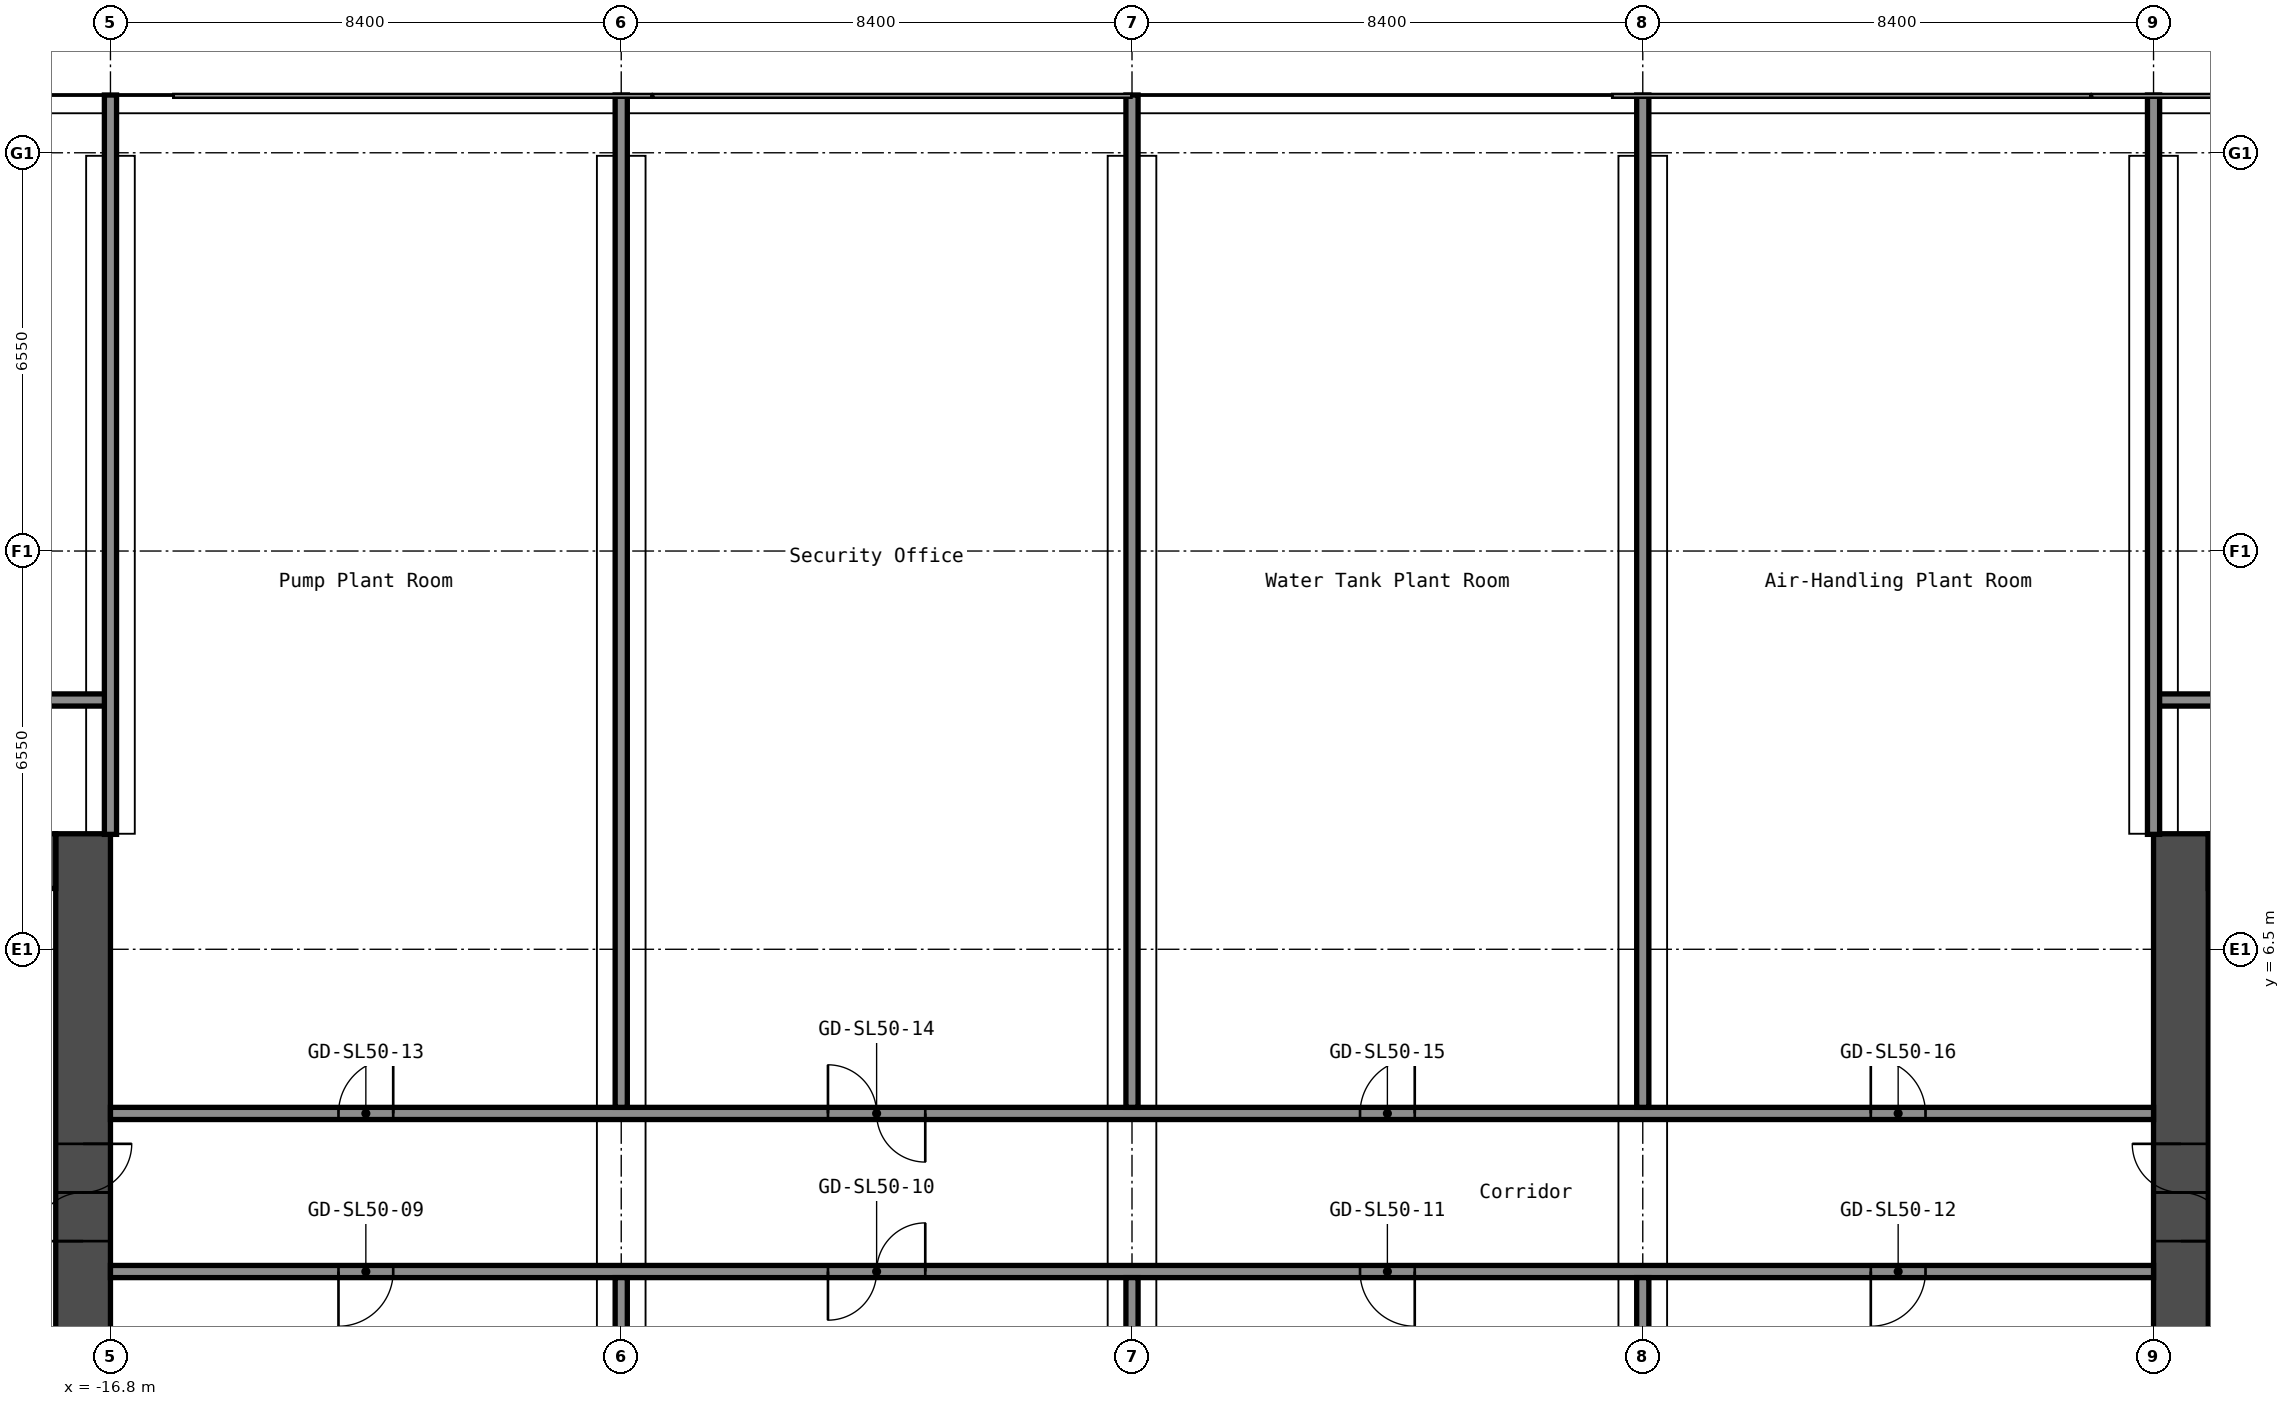
"""IFC4 building model, lengths in metres.
Left out: names, types, materials, properties, quantities, classifications, styles, units other than length and angle.
Written with IfcOpenShell. Run it as: python <this file> out.ifc"""

import sys

from ifc_helpers import new_model, si_unit, direction, frame, frame_2d, origin, place, context, subcontext, project, spatial, rectangle, extrude, element, fill, save


model = new_model("IFC4")
c1 = context("Model", 3, precision=1e-05, world=origin(), true_north=direction((0.0, 1.0)))
c2 = subcontext(c1, "Body", "Model", "MODEL_VIEW")
j1 = project(units=[si_unit("LENGTHUNIT", "METRE"), si_unit("PLANEANGLEUNIT", "RADIAN")], contexts=[c1])
p1 = place(None, origin())
s1 = spatial("IfcSite", under=j1, at=p1, CompositionType="ELEMENT")
p2 = place(p1, origin())
s2 = spatial("IfcBuilding", under=s1, at=p2, CompositionType="ELEMENT")
p3 = place(p2, frame((0.0, 0.0, 175.8)))
s3 = spatial("IfcBuildingStorey", under=s2, at=p3, CompositionType="ELEMENT", Elevation=175.8)
p4 = place(p3, frame((-17.25, -8.4, 0.0), z_axis=(0.0, 0.0, 1.0), x_axis=(0.0, 1.0, 0.0)))
e1 = element("IfcWall", 1, at=p4, inside=s3, PredefinedType="SHEAR", context=c2, shape_type="SweptSolid", body=[
    extrude(rectangle(XDim=16.8, YDim=0.9, at=frame_2d((8.4, 0.0))), origin(), (0.0, 0.0, 1.0), 4.1),
])
p5 = place(p4, frame((10.1, 0.0, 0.0)))
e2 = element("IfcOpeningElement", 2, at=p5, cuts=e1, PredefinedType="OPENING", context=c2, shape_type="SweptSolid", body=[
    extrude(rectangle(XDim=1.6, YDim=2.1, at=frame_2d((0.8, 1.05))), frame((0.0, 0.46, 0.0), z_axis=(0.0, -1.0, 0.0), x_axis=(1.0, 0.0, 0.0)), (0.0, 0.0, 1.0), 0.92),
])
p6 = place(p3, frame((-32.7, 7.95, 0.0), z_axis=(0.0, 0.0, 1.0), x_axis=(1.0, 0.0, 0.0)))
e3 = element("IfcWall", 3, at=p6, inside=s3, PredefinedType="SHEAR", context=c2, shape_type="SweptSolid", body=[
    extrude(rectangle(XDim=15.0, YDim=0.9, at=frame_2d((7.5, 0.0))), origin(), (0.0, 0.0, 1.0), 4.1),
])
p7 = place(p6, frame((3.4, 0.0, 0.0)))
e4 = element("IfcOpeningElement", 4, at=p7, cuts=e3, PredefinedType="OPENING", context=c2, shape_type="SweptSolid", body=[
    extrude(rectangle(XDim=1.2, YDim=2.1, at=frame_2d((0.6, 1.05))), frame((0.0, 0.46, 0.0), z_axis=(0.0, -1.0, 0.0), x_axis=(1.0, 0.0, 0.0)), (0.0, 0.0, 1.0), 0.92),
])
p8 = place(p6, frame((0.75, 0.0, 0.0)))
e5 = element("IfcOpeningElement", 5, at=p8, cuts=e3, PredefinedType="OPENING", context=c2, shape_type="SweptSolid", body=[
    extrude(rectangle(XDim=0.9, YDim=2.1, at=frame_2d((0.45, 1.05))), frame((0.0, 0.46, 0.0), z_axis=(0.0, -1.0, 0.0), x_axis=(1.0, 0.0, 0.0)), (0.0, 0.0, 1.0), 0.92),
])
p9 = place(p3, frame((17.25, -8.4, 0.0), z_axis=(0.0, 0.0, 1.0), x_axis=(0.0, 1.0, 0.0)))
e6 = element("IfcWall", 6, at=p9, inside=s3, PredefinedType="SHEAR", context=c2, shape_type="SweptSolid", body=[
    extrude(rectangle(XDim=16.8, YDim=0.9, at=frame_2d((8.4, 0.0))), origin(), (0.0, 0.0, 1.0), 4.1),
])
p10 = place(p9, frame((10.1, 0.0, 0.0)))
e7 = element("IfcOpeningElement", 7, at=p10, cuts=e6, PredefinedType="OPENING", context=c2, shape_type="SweptSolid", body=[
    extrude(rectangle(XDim=1.6, YDim=2.1, at=frame_2d((0.8, 1.05))), frame((0.0, 0.46, 0.0), z_axis=(0.0, -1.0, 0.0), x_axis=(1.0, 0.0, 0.0)), (0.0, 0.0, 1.0), 0.92),
])
p11 = place(p3, frame((17.7, 7.95, 0.0), z_axis=(0.0, 0.0, 1.0), x_axis=(1.0, 0.0, 0.0)))
e8 = element("IfcWall", 8, at=p11, inside=s3, PredefinedType="SHEAR", context=c2, shape_type="SweptSolid", body=[
    extrude(rectangle(XDim=15.0, YDim=0.9, at=frame_2d((7.5, 0.0))), origin(), (0.0, 0.0, 1.0), 4.1),
])
p12 = place(p11, frame((10.4, 0.0, 0.0)))
e9 = element("IfcOpeningElement", 9, at=p12, cuts=e8, PredefinedType="OPENING", context=c2, shape_type="SweptSolid", body=[
    extrude(rectangle(XDim=1.2, YDim=2.1, at=frame_2d((0.6, 1.05))), frame((0.0, 0.46, 0.0), z_axis=(0.0, -1.0, 0.0), x_axis=(1.0, 0.0, 0.0)), (0.0, 0.0, 1.0), 0.92),
])
p13 = place(p11, frame((13.35, 0.0, 0.0)))
e10 = element("IfcOpeningElement", 10, at=p13, cuts=e8, PredefinedType="OPENING", context=c2, shape_type="SweptSolid", body=[
    extrude(rectangle(XDim=0.9, YDim=2.1, at=frame_2d((0.45, 1.05))), frame((0.0, 0.46, 0.0), z_axis=(0.0, -1.0, 0.0), x_axis=(1.0, 0.0, 0.0)), (0.0, 0.0, 1.0), 0.92),
])
p14 = place(p3, frame((-16.8, 1.2, 0.0), z_axis=(0.0, 0.0, 1.0), x_axis=(1.0, 0.0, 0.0)))
e11 = element("IfcWall", 11, at=p14, inside=s3, PredefinedType="PARTITIONING", context=c2, shape_type="SweptSolid", body=[
    extrude(rectangle(XDim=33.6, YDim=0.2, at=frame_2d((16.8, 0.0))), origin(), (0.0, 0.0, 1.0), 4.1),
])
p15 = place(p14, frame((3.75, 0.0, 0.0)))
e12 = element("IfcOpeningElement", 12, at=p15, cuts=e11, PredefinedType="OPENING", context=c2, shape_type="SweptSolid", body=[
    extrude(rectangle(XDim=0.9, YDim=2.1, at=frame_2d((0.45, 1.05))), frame((0.0, 0.11, 0.0), z_axis=(0.0, -1.0, 0.0), x_axis=(1.0, 0.0, 0.0)), (0.0, 0.0, 1.0), 0.22),
])
p16 = place(p14, frame((11.8, 0.0, 0.0)))
e13 = element("IfcOpeningElement", 13, at=p16, cuts=e11, PredefinedType="OPENING", context=c2, shape_type="SweptSolid", body=[
    extrude(rectangle(XDim=1.6, YDim=2.1, at=frame_2d((0.8, 1.05))), frame((0.0, 0.11, 0.0), z_axis=(0.0, -1.0, 0.0), x_axis=(1.0, 0.0, 0.0)), (0.0, 0.0, 1.0), 0.22),
])
p17 = place(p14, frame((20.55, 0.0, 0.0)))
e14 = element("IfcOpeningElement", 14, at=p17, cuts=e11, PredefinedType="OPENING", context=c2, shape_type="SweptSolid", body=[
    extrude(rectangle(XDim=0.9, YDim=2.1, at=frame_2d((0.45, 1.05))), frame((0.0, 0.11, 0.0), z_axis=(0.0, -1.0, 0.0), x_axis=(1.0, 0.0, 0.0)), (0.0, 0.0, 1.0), 0.22),
])
p18 = place(p14, frame((28.95, 0.0, 0.0)))
e15 = element("IfcOpeningElement", 15, at=p18, cuts=e11, PredefinedType="OPENING", context=c2, shape_type="SweptSolid", body=[
    extrude(rectangle(XDim=0.9, YDim=2.1, at=frame_2d((0.45, 1.05))), frame((0.0, 0.11, 0.0), z_axis=(0.0, -1.0, 0.0), x_axis=(1.0, 0.0, 0.0)), (0.0, 0.0, 1.0), 0.22),
])
p19 = place(p3, frame((-16.8, 3.8, 0.0), z_axis=(0.0, 0.0, 1.0), x_axis=(1.0, 0.0, 0.0)))
e16 = element("IfcWall", 16, at=p19, inside=s3, PredefinedType="PARTITIONING", context=c2, shape_type="SweptSolid", body=[
    extrude(rectangle(XDim=33.6, YDim=0.2, at=frame_2d((16.8, 0.0))), origin(), (0.0, 0.0, 1.0), 4.1),
])
p20 = place(p19, frame((3.75, 0.0, 0.0)))
e17 = element("IfcOpeningElement", 17, at=p20, cuts=e16, PredefinedType="OPENING", context=c2, shape_type="SweptSolid", body=[
    extrude(rectangle(XDim=0.9, YDim=2.1, at=frame_2d((0.45, 1.05))), frame((0.0, 0.11, 0.0), z_axis=(0.0, -1.0, 0.0), x_axis=(1.0, 0.0, 0.0)), (0.0, 0.0, 1.0), 0.22),
])
p21 = place(p19, frame((11.8, 0.0, 0.0)))
e18 = element("IfcOpeningElement", 18, at=p21, cuts=e16, PredefinedType="OPENING", context=c2, shape_type="SweptSolid", body=[
    extrude(rectangle(XDim=1.6, YDim=2.1, at=frame_2d((0.8, 1.05))), frame((0.0, 0.11, 0.0), z_axis=(0.0, -1.0, 0.0), x_axis=(1.0, 0.0, 0.0)), (0.0, 0.0, 1.0), 0.22),
])
p22 = place(p19, frame((20.55, 0.0, 0.0)))
e19 = element("IfcOpeningElement", 19, at=p22, cuts=e16, PredefinedType="OPENING", context=c2, shape_type="SweptSolid", body=[
    extrude(rectangle(XDim=0.9, YDim=2.1, at=frame_2d((0.45, 1.05))), frame((0.0, 0.11, 0.0), z_axis=(0.0, -1.0, 0.0), x_axis=(1.0, 0.0, 0.0)), (0.0, 0.0, 1.0), 0.22),
])
p23 = place(p19, frame((28.95, 0.0, 0.0)))
e20 = element("IfcOpeningElement", 20, at=p23, cuts=e16, PredefinedType="OPENING", context=c2, shape_type="SweptSolid", body=[
    extrude(rectangle(XDim=0.9, YDim=2.1, at=frame_2d((0.45, 1.05))), frame((0.0, 0.11, 0.0), z_axis=(0.0, -1.0, 0.0), x_axis=(1.0, 0.0, 0.0)), (0.0, 0.0, 1.0), 0.22),
])
p24 = place(p3, frame((-42.7, 10.6, 0.0), z_axis=(0.0, 0.0, 1.0), x_axis=(1.0, 0.0, 0.0)))
e21 = element("IfcWall", 21, at=p24, inside=s3, PredefinedType="PARTITIONING", context=c2, shape_type="SweptSolid", body=[
    extrude(rectangle(XDim=25.9, YDim=0.2, at=frame_2d((12.95, 0.0))), origin(), (0.0, 0.0, 1.0), 4.1),
])
p25 = place(p24, frame((3.9, 0.0, 0.0)))
e22 = element("IfcOpeningElement", 22, at=p25, cuts=e21, PredefinedType="OPENING", context=c2, shape_type="SweptSolid", body=[
    extrude(rectangle(XDim=1.6, YDim=2.1, at=frame_2d((0.8, 1.05))), frame((0.0, 0.11, 0.0), z_axis=(0.0, -1.0, 0.0), x_axis=(1.0, 0.0, 0.0)), (0.0, 0.0, 1.0), 0.22),
])
p26 = place(p24, frame((12.5, 0.0, 0.0)))
e23 = element("IfcOpeningElement", 23, at=p26, cuts=e21, PredefinedType="OPENING", context=c2, shape_type="SweptSolid", body=[
    extrude(rectangle(XDim=1.6, YDim=2.1, at=frame_2d((0.8, 1.05))), frame((0.0, 0.11, 0.0), z_axis=(0.0, -1.0, 0.0), x_axis=(1.0, 0.0, 0.0)), (0.0, 0.0, 1.0), 0.22),
])
p27 = place(p24, frame((20.9, 0.0, 0.0)))
e24 = element("IfcOpeningElement", 24, at=p27, cuts=e21, PredefinedType="OPENING", context=c2, shape_type="SweptSolid", body=[
    extrude(rectangle(XDim=1.6, YDim=2.1, at=frame_2d((0.8, 1.05))), frame((0.0, 0.11, 0.0), z_axis=(0.0, -1.0, 0.0), x_axis=(1.0, 0.0, 0.0)), (0.0, 0.0, 1.0), 0.22),
])
p28 = place(p3, frame((16.8, 10.6, 0.0), z_axis=(0.0, 0.0, 1.0), x_axis=(1.0, 0.0, 0.0)))
e25 = element("IfcWall", 25, at=p28, inside=s3, PredefinedType="PARTITIONING", context=c2, shape_type="SweptSolid", body=[
    extrude(rectangle(XDim=25.9, YDim=0.2, at=frame_2d((12.95, 0.0))), origin(), (0.0, 0.0, 1.0), 4.1),
])
p29 = place(p28, frame((3.4, 0.0, 0.0)))
e26 = element("IfcOpeningElement", 26, at=p29, cuts=e25, PredefinedType="OPENING", context=c2, shape_type="SweptSolid", body=[
    extrude(rectangle(XDim=1.6, YDim=2.1, at=frame_2d((0.8, 1.05))), frame((0.0, 0.11, 0.0), z_axis=(0.0, -1.0, 0.0), x_axis=(1.0, 0.0, 0.0)), (0.0, 0.0, 1.0), 0.22),
])
p30 = place(p28, frame((12.15, 0.0, 0.0)))
e27 = element("IfcOpeningElement", 27, at=p30, cuts=e25, PredefinedType="OPENING", context=c2, shape_type="SweptSolid", body=[
    extrude(rectangle(XDim=0.9, YDim=2.1, at=frame_2d((0.45, 1.05))), frame((0.0, 0.11, 0.0), z_axis=(0.0, -1.0, 0.0), x_axis=(1.0, 0.0, 0.0)), (0.0, 0.0, 1.0), 0.22),
])
p31 = place(p28, frame((20.4, 0.0, 0.0)))
e28 = element("IfcOpeningElement", 28, at=p31, cuts=e25, PredefinedType="OPENING", context=c2, shape_type="SweptSolid", body=[
    extrude(rectangle(XDim=1.6, YDim=2.1, at=frame_2d((0.8, 1.05))), frame((0.0, 0.11, 0.0), z_axis=(0.0, -1.0, 0.0), x_axis=(1.0, 0.0, 0.0)), (0.0, 0.0, 1.0), 0.22),
])
p32 = place(p3, frame((-16.8, 8.39, 0.0), z_axis=(0.0, 0.0, 1.0), x_axis=(0.0, 1.0, 0.0)))
e29 = element("IfcWall", 29, at=p32, inside=s3, PredefinedType="PARTITIONING", context=c2, shape_type="SweptSolid", body=[
    extrude(rectangle(XDim=12.16, YDim=0.2, at=frame_2d((6.08, 0.0))), origin(), (0.0, 0.0, 1.0), 4.1),
])
p33 = place(p3, frame((-8.4, -19.3, 0.0), z_axis=(0.0, 0.0, 1.0), x_axis=(0.0, 1.0, 0.0)))
e30 = element("IfcWall", 30, at=p33, inside=s3, PredefinedType="PARTITIONING", context=c2, shape_type="SweptSolid", body=[
    extrude(rectangle(XDim=20.4, YDim=0.2, at=frame_2d((10.2, 0.0))), origin(), (0.0, 0.0, 1.0), 4.1),
])
p34 = place(p3, frame((-8.4, 3.9, 0.0), z_axis=(0.0, 0.0, 1.0), x_axis=(0.0, 1.0, 0.0)))
e31 = element("IfcWall", 31, at=p34, inside=s3, PredefinedType="PARTITIONING", context=c2, shape_type="SweptSolid", body=[
    extrude(rectangle(XDim=16.65, YDim=0.2, at=frame_2d((8.325, 0.0))), origin(), (0.0, 0.0, 1.0), 4.1),
])
p35 = place(p3, frame((0.0, -19.3, 0.0), z_axis=(0.0, 0.0, 1.0), x_axis=(0.0, 1.0, 0.0)))
e32 = element("IfcWall", 32, at=p35, inside=s3, PredefinedType="PARTITIONING", context=c2, shape_type="SweptSolid", body=[
    extrude(rectangle(XDim=20.4, YDim=0.2, at=frame_2d((10.2, 0.0))), origin(), (0.0, 0.0, 1.0), 4.1),
])
p36 = place(p3, frame((0.0, 3.9, 0.0), z_axis=(0.0, 0.0, 1.0), x_axis=(0.0, 1.0, 0.0)))
e33 = element("IfcWall", 33, at=p36, inside=s3, PredefinedType="PARTITIONING", context=c2, shape_type="SweptSolid", body=[
    extrude(rectangle(XDim=16.65, YDim=0.2, at=frame_2d((8.325, 0.0))), origin(), (0.0, 0.0, 1.0), 4.1),
])
p37 = place(p3, frame((8.4, -19.3, 0.0), z_axis=(0.0, 0.0, 1.0), x_axis=(0.0, 1.0, 0.0)))
e34 = element("IfcWall", 34, at=p37, inside=s3, PredefinedType="PARTITIONING", context=c2, shape_type="SweptSolid", body=[
    extrude(rectangle(XDim=20.4, YDim=0.2, at=frame_2d((10.2, 0.0))), origin(), (0.0, 0.0, 1.0), 4.1),
])
p38 = place(p3, frame((8.4, 3.9, 0.0), z_axis=(0.0, 0.0, 1.0), x_axis=(0.0, 1.0, 0.0)))
e35 = element("IfcWall", 35, at=p38, inside=s3, PredefinedType="PARTITIONING", context=c2, shape_type="SweptSolid", body=[
    extrude(rectangle(XDim=16.65, YDim=0.2, at=frame_2d((8.325, 0.0))), origin(), (0.0, 0.0, 1.0), 4.1),
])
p39 = place(p3, frame((16.8, 8.39, 0.0), z_axis=(0.0, 0.0, 1.0), x_axis=(0.0, 1.0, 0.0)))
e36 = element("IfcWall", 36, at=p39, inside=s3, PredefinedType="PARTITIONING", context=c2, shape_type="SweptSolid", body=[
    extrude(rectangle(XDim=12.16, YDim=0.2, at=frame_2d((6.08, 0.0))), origin(), (0.0, 0.0, 1.0), 4.1),
])
p40 = place(p5, origin())
e37 = element("IfcDoor", 37, at=p40, inside=s3, OperationType="DOUBLE_DOOR_SINGLE_SWING", PredefinedType="DOOR", context=c2, shape_type="SweptSolid", body=[
    extrude(rectangle(XDim=1.6, YDim=2.1, at=frame_2d((0.8, 1.05))), frame((0.0, 0.025, 0.0), z_axis=(0.0, -1.0, 0.0), x_axis=(1.0, 0.0, 0.0)), (0.0, 0.0, 1.0), 0.05),
])
fill(e2, e37)
p41 = place(p10, origin())
e38 = element("IfcDoor", 38, at=p41, inside=s3, OperationType="DOUBLE_DOOR_SINGLE_SWING", PredefinedType="DOOR", context=c2, shape_type="SweptSolid", body=[
    extrude(rectangle(XDim=1.6, YDim=2.1, at=frame_2d((0.8, 1.05))), frame((0.0, 0.025, 0.0), z_axis=(0.0, -1.0, 0.0), x_axis=(1.0, 0.0, 0.0)), (0.0, 0.0, 1.0), 0.05),
])
fill(e7, e38)
p42 = place(p15, origin())
e39 = element("IfcDoor", 39, at=p42, inside=s3, OperationType="SINGLE_SWING_LEFT", PredefinedType="DOOR", context=c2, shape_type="SweptSolid", body=[
    extrude(rectangle(XDim=0.9, YDim=2.1, at=frame_2d((0.45, 1.05))), frame((0.0, 0.025, 0.0), z_axis=(0.0, -1.0, 0.0), x_axis=(1.0, 0.0, 0.0)), (0.0, 0.0, 1.0), 0.05),
])
fill(e12, e39)
p43 = place(p16, origin())
e40 = element("IfcDoor", 40, at=p43, inside=s3, OperationType="DOUBLE_DOOR_SINGLE_SWING", PredefinedType="DOOR", context=c2, shape_type="SweptSolid", body=[
    extrude(rectangle(XDim=1.6, YDim=2.1, at=frame_2d((0.8, 1.05))), frame((0.0, 0.025, 0.0), z_axis=(0.0, -1.0, 0.0), x_axis=(1.0, 0.0, 0.0)), (0.0, 0.0, 1.0), 0.05),
])
fill(e13, e40)
p44 = place(p17, origin())
e41 = element("IfcDoor", 41, at=p44, inside=s3, OperationType="SINGLE_SWING_RIGHT", PredefinedType="DOOR", context=c2, shape_type="SweptSolid", body=[
    extrude(rectangle(XDim=0.9, YDim=2.1, at=frame_2d((0.45, 1.05))), frame((0.0, 0.025, 0.0), z_axis=(0.0, -1.0, 0.0), x_axis=(1.0, 0.0, 0.0)), (0.0, 0.0, 1.0), 0.05),
])
fill(e14, e41)
p45 = place(p18, origin())
e42 = element("IfcDoor", 42, at=p45, inside=s3, OperationType="SINGLE_SWING_LEFT", PredefinedType="DOOR", context=c2, shape_type="SweptSolid", body=[
    extrude(rectangle(XDim=0.9, YDim=2.1, at=frame_2d((0.45, 1.05))), frame((0.0, 0.025, 0.0), z_axis=(0.0, -1.0, 0.0), x_axis=(1.0, 0.0, 0.0)), (0.0, 0.0, 1.0), 0.05),
])
fill(e15, e42)
p46 = place(p20, origin())
e43 = element("IfcDoor", 43, at=p46, inside=s3, OperationType="SINGLE_SWING_LEFT", PredefinedType="DOOR", context=c2, shape_type="SweptSolid", body=[
    extrude(rectangle(XDim=0.9, YDim=2.1, at=frame_2d((0.45, 1.05))), frame((0.0, 0.025, 0.0), z_axis=(0.0, -1.0, 0.0), x_axis=(1.0, 0.0, 0.0)), (0.0, 0.0, 1.0), 0.05),
])
fill(e17, e43)
p47 = place(p21, origin())
e44 = element("IfcDoor", 44, at=p47, inside=s3, OperationType="DOUBLE_DOOR_SINGLE_SWING", PredefinedType="DOOR", context=c2, shape_type="SweptSolid", body=[
    extrude(rectangle(XDim=1.6, YDim=2.1, at=frame_2d((0.8, 1.05))), frame((0.0, 0.025, 0.0), z_axis=(0.0, -1.0, 0.0), x_axis=(1.0, 0.0, 0.0)), (0.0, 0.0, 1.0), 0.05),
])
fill(e18, e44)
p48 = place(p22, origin())
e45 = element("IfcDoor", 45, at=p48, inside=s3, OperationType="SINGLE_SWING_LEFT", PredefinedType="DOOR", context=c2, shape_type="SweptSolid", body=[
    extrude(rectangle(XDim=0.9, YDim=2.1, at=frame_2d((0.45, 1.05))), frame((0.0, 0.025, 0.0), z_axis=(0.0, -1.0, 0.0), x_axis=(1.0, 0.0, 0.0)), (0.0, 0.0, 1.0), 0.05),
])
fill(e19, e45)
p49 = place(p23, origin())
e46 = element("IfcDoor", 46, at=p49, inside=s3, OperationType="SINGLE_SWING_RIGHT", PredefinedType="DOOR", context=c2, shape_type="SweptSolid", body=[
    extrude(rectangle(XDim=0.9, YDim=2.1, at=frame_2d((0.45, 1.05))), frame((0.0, 0.025, 0.0), z_axis=(0.0, -1.0, 0.0), x_axis=(1.0, 0.0, 0.0)), (0.0, 0.0, 1.0), 0.05),
])
fill(e20, e46)
save(model, sys.argv[1])
